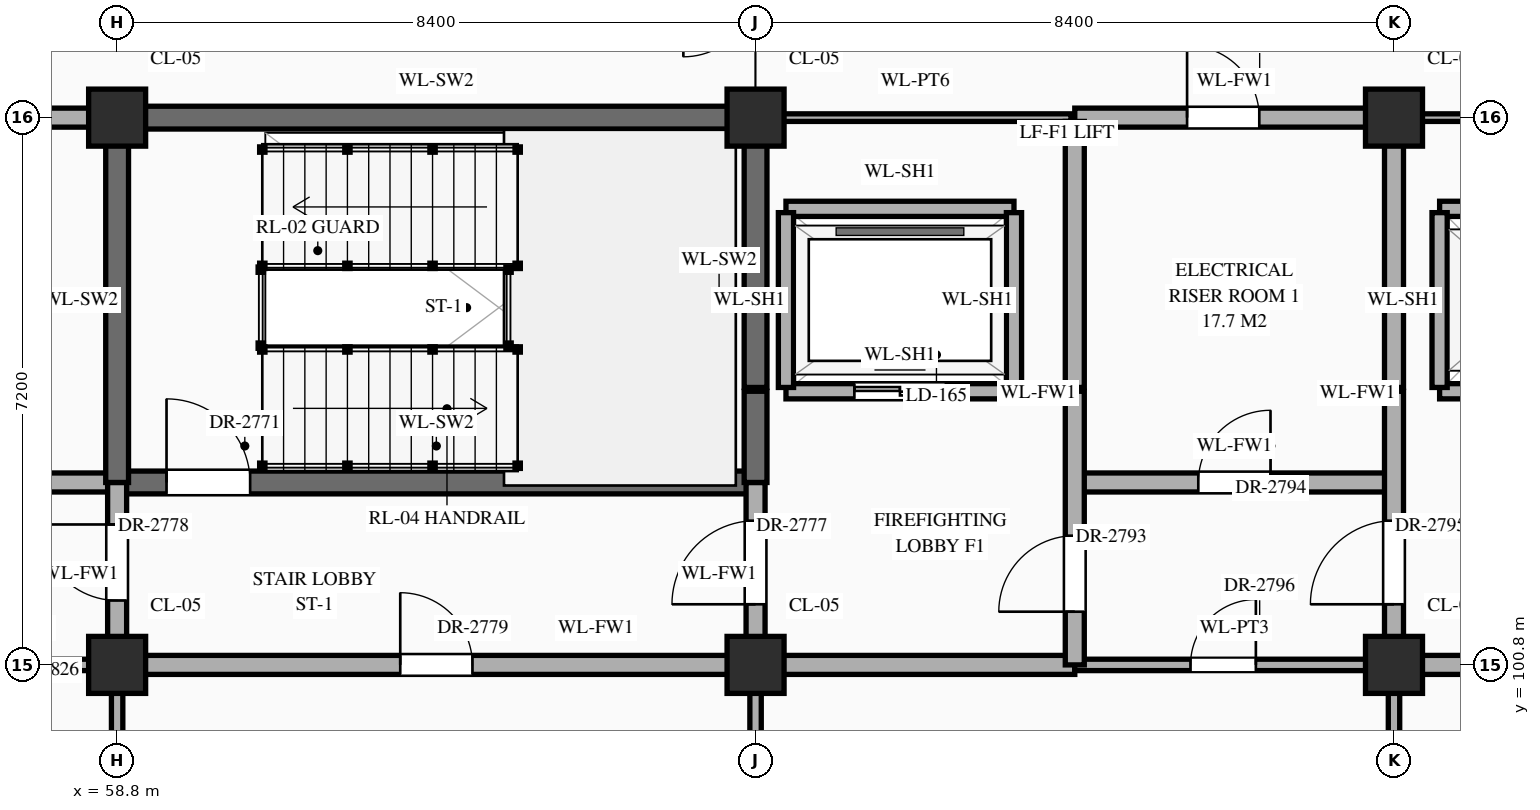
"""IFC4 building model, lengths in metres.
Left out: names, types, materials, properties, quantities, classifications, styles, units other than length and angle.
Written with IfcOpenShell. Run it as: python <this file> out.ifc"""

import sys

from ifc_helpers import new_model, si_unit, direction, frame, frame_2d, origin, origin_2d, place, context, subcontext, project, spatial, rectangle, extrude, element, fill, save


model = new_model("IFC4")
c1 = context("Model", 3, precision=1e-05, world=origin(), true_north=direction((0.0, 1.0)))
c2 = subcontext(c1, "Body", "Model", "MODEL_VIEW")
j1 = project(units=[si_unit("LENGTHUNIT", "METRE"), si_unit("PLANEANGLEUNIT", "RADIAN")], contexts=[c1])
p1 = place(None, origin())
s1 = spatial("IfcSite", under=j1, at=p1, CompositionType="ELEMENT")
p2 = place(p1, origin())
s2 = spatial("IfcBuilding", under=s1, at=p2, CompositionType="ELEMENT")
p3 = place(p2, frame((0.0, 0.0, 43.5)))
s3 = spatial("IfcBuildingStorey", under=s2, at=p3, CompositionType="ELEMENT", Elevation=43.5)
for number, where, z_axis, x_axis in (
    (1, (58.8, 100.8, 0.0), (0.0, 0.0, 1.0), (1.0, 0.0, 0.0)),
    (2, (58.8, 108.0, 0.0), (0.0, 0.0, 1.0), (1.0, 0.0, 0.0)),
    (3, (67.2, 100.8, 0.0), (0.0, 0.0, 1.0), (1.0, 0.0, 0.0)),
    (4, (67.2, 108.0, 0.0), (0.0, 0.0, 1.0), (1.0, 0.0, 0.0)),
    (5, (75.6, 100.8, 0.0), (0.0, 0.0, 1.0), (1.0, 0.0, 0.0)),
    (6, (75.6, 108.0, 0.0), (0.0, 0.0, 1.0), (1.0, 0.0, 0.0)),
):
    element("IfcColumn", number, at=place(p3, frame(where, z_axis=z_axis, x_axis=x_axis)), inside=s3, PredefinedType="COLUMN", context=c2, shape_type="SweptSolid", body=[
        extrude(rectangle(XDim=0.75, YDim=0.75, at=origin_2d()), origin(), (0.0, 0.0, 1.0), 4.2),
    ])
p4 = place(p3, frame((56.2, 100.8, 0.0), z_axis=(0.0, 0.0, 1.0), x_axis=(1.0, 0.0, 0.0)))
e7 = element("IfcWall", 7, at=p4, inside=s3, PredefinedType="STANDARD", context=c2, shape_type="SweptSolid", body=[
    extrude(rectangle(XDim=2.6, YDim=0.15, at=frame_2d((1.3, 0.0))), origin(), (0.0, 0.0, 1.0), 3.1),
])
p5 = place(p4, frame((0.643, 0.0, 0.0)))
e8 = element("IfcOpeningElement", 8, at=p5, cuts=e7, PredefinedType="OPENING", context=c2, shape_type="SweptSolid", body=[
    extrude(rectangle(XDim=1.02, YDim=2.4, at=frame_2d((0.51, 1.2))), frame((0.0, 0.087, 0.0), z_axis=(0.0, -1.0, 0.0), x_axis=(1.0, 0.0, 0.0)), (0.0, 0.0, 1.0), 0.174),
])
p6 = place(p3, frame((58.8, 100.8, 0.0), z_axis=(0.0, 0.0, 1.0), x_axis=(1.0, 0.0, 0.0)))
e9 = element("IfcWall", 9, at=p6, inside=s3, PredefinedType="STANDARD", context=c2, shape_type="SweptSolid", body=[
    extrude(rectangle(XDim=12.6, YDim=0.25, at=frame_2d((6.3, 0.0))), origin(), (0.0, 0.0, 1.0), 3.1),
])
p7 = place(p6, frame((3.725, 0.0, 0.0)))
e10 = element("IfcOpeningElement", 10, at=p7, cuts=e9, PredefinedType="OPENING", context=c2, shape_type="SweptSolid", body=[
    extrude(rectangle(XDim=0.95, YDim=2.15, at=frame_2d((0.475, 1.075))), frame((0.0, 0.137, 0.0), z_axis=(0.0, -1.0, 0.0), x_axis=(1.0, 0.0, 0.0)), (0.0, 0.0, 1.0), 0.274),
])
p8 = place(p3, frame((71.4, 100.8, 0.0), z_axis=(0.0, 0.0, 1.0), x_axis=(1.0, 0.0, 0.0)))
e11 = element("IfcWall", 11, at=p8, inside=s3, PredefinedType="STANDARD", context=c2, shape_type="SweptSolid", body=[
    extrude(rectangle(XDim=4.2, YDim=0.15, at=frame_2d((2.1, 0.0))), origin(), (0.0, 0.0, 1.0), 3.1),
])
p9 = place(p8, frame((1.522, 0.0, 0.0)))
e12 = element("IfcOpeningElement", 12, at=p9, cuts=e11, PredefinedType="OPENING", context=c2, shape_type="SweptSolid", body=[
    extrude(rectangle(XDim=0.86, YDim=2.1, at=frame_2d((0.43, 1.05))), frame((0.0, 0.087, 0.0), z_axis=(0.0, -1.0, 0.0), x_axis=(1.0, 0.0, 0.0)), (0.0, 0.0, 1.0), 0.174),
])
p10 = place(p3, frame((75.6, 100.8, 0.0), z_axis=(0.0, 0.0, 1.0), x_axis=(1.0, 0.0, 0.0)))
e13 = element("IfcWall", 13, at=p10, inside=s3, PredefinedType="STANDARD", context=c2, shape_type="SweptSolid", body=[
    extrude(rectangle(XDim=16.8, YDim=0.25, at=frame_2d((8.4, 0.0))), origin(), (0.0, 0.0, 1.0), 3.1),
])
p11 = place(p10, frame((3.725, 0.0, 0.0)))
e14 = element("IfcOpeningElement", 14, at=p11, cuts=e13, PredefinedType="OPENING", context=c2, shape_type="SweptSolid", body=[
    extrude(rectangle(XDim=0.95, YDim=2.15, at=frame_2d((0.475, 1.075))), frame((0.0, 0.137, 0.0), z_axis=(0.0, -1.0, 0.0), x_axis=(1.0, 0.0, 0.0)), (0.0, 0.0, 1.0), 0.274),
])
p12 = place(p10, frame((9.748, 0.0, 0.0)))
e15 = element("IfcOpeningElement", 15, at=p12, cuts=e13, PredefinedType="OPENING", context=c2, shape_type="SweptSolid", body=[
    extrude(rectangle(XDim=1.0, YDim=2.2, at=frame_2d((0.5, 1.1))), frame((0.0, 0.137, 0.0), z_axis=(0.0, -1.0, 0.0), x_axis=(1.0, 0.0, 0.0)), (0.0, 0.0, 1.0), 0.274),
])
p13 = place(p10, frame((12.525, 0.0, 0.0)))
e16 = element("IfcOpeningElement", 16, at=p13, cuts=e13, PredefinedType="OPENING", context=c2, shape_type="SweptSolid", body=[
    extrude(rectangle(XDim=0.95, YDim=2.15, at=frame_2d((0.475, 1.075))), frame((0.0, 0.137, 0.0), z_axis=(0.0, -1.0, 0.0), x_axis=(1.0, 0.0, 0.0)), (0.0, 0.0, 1.0), 0.274),
])
p14 = place(p10, frame((14.802, 0.0, 0.0)))
e17 = element("IfcOpeningElement", 17, at=p14, cuts=e13, PredefinedType="OPENING", context=c2, shape_type="SweptSolid", body=[
    extrude(rectangle(XDim=1.1, YDim=2.2, at=frame_2d((0.55, 1.1))), frame((0.0, 0.137, 0.0), z_axis=(0.0, -1.0, 0.0), x_axis=(1.0, 0.0, 0.0)), (0.0, 0.0, 1.0), 0.274),
])
p15 = place(p3, frame((54.6, 103.2, 0.0), z_axis=(0.0, 0.0, 1.0), x_axis=(1.0, 0.0, 0.0)))
e18 = element("IfcWall", 18, at=p15, inside=s3, PredefinedType="STANDARD", context=c2, shape_type="SweptSolid", body=[
    extrude(rectangle(XDim=4.2, YDim=0.25, at=frame_2d((2.1, 0.0))), origin(), (0.0, 0.0, 1.0), 3.95),
])
p16 = place(p15, frame((1.625, 0.0, 0.0)))
e19 = element("IfcOpeningElement", 19, at=p16, cuts=e18, PredefinedType="OPENING", context=c2, shape_type="SweptSolid", body=[
    extrude(rectangle(XDim=0.95, YDim=2.15, at=frame_2d((0.475, 1.075))), frame((0.0, 0.137, 0.0), z_axis=(0.0, -1.0, 0.0), x_axis=(1.0, 0.0, 0.0)), (0.0, 0.0, 1.0), 0.274),
])
p17 = place(p3, frame((58.8, 103.2, 0.0), z_axis=(0.0, 0.0, 1.0), x_axis=(1.0, 0.0, 0.0)))
e20 = element("IfcWall", 20, at=p17, inside=s3, PredefinedType="SHEAR", context=c2, shape_type="SweptSolid", body=[
    extrude(rectangle(XDim=8.4, YDim=0.3, at=frame_2d((4.2, 0.0))), origin(), (0.0, 0.0, 1.0), 3.95),
])
p18 = place(p17, frame((0.65, 0.0, 0.0)))
e21 = element("IfcOpeningElement", 21, at=p18, cuts=e20, PredefinedType="OPENING", context=c2, shape_type="SweptSolid", body=[
    extrude(rectangle(XDim=1.1, YDim=2.2, at=frame_2d((0.55, 1.1))), frame((0.0, 0.162, 0.0), z_axis=(0.0, -1.0, 0.0), x_axis=(1.0, 0.0, 0.0)), (0.0, 0.0, 1.0), 0.324),
])
p19 = place(p3, frame((71.4, 103.2, 0.0), z_axis=(0.0, 0.0, 1.0), x_axis=(1.0, 0.0, 0.0)))
e22 = element("IfcWall", 22, at=p19, inside=s3, PredefinedType="STANDARD", context=c2, shape_type="SweptSolid", body=[
    extrude(rectangle(XDim=4.2, YDim=0.25, at=frame_2d((2.1, 0.0))), origin(), (0.0, 0.0, 1.0), 3.95),
])
p20 = place(p19, frame((1.625, 0.0, 0.0)))
e23 = element("IfcOpeningElement", 23, at=p20, cuts=e22, PredefinedType="OPENING", context=c2, shape_type="SweptSolid", body=[
    extrude(rectangle(XDim=0.95, YDim=2.15, at=frame_2d((0.475, 1.075))), frame((0.0, 0.137, 0.0), z_axis=(0.0, -1.0, 0.0), x_axis=(1.0, 0.0, 0.0)), (0.0, 0.0, 1.0), 0.274),
])
p21 = place(p3, frame((67.6, 104.4, 0.0), z_axis=(0.0, 0.0, 1.0), x_axis=(1.0, 0.0, 0.0)))
e24 = element("IfcWall", 24, at=p21, inside=s3, PredefinedType="STANDARD", context=c2, shape_type="SweptSolid", body=[
    extrude(rectangle(XDim=3.0, YDim=0.2, at=frame_2d((1.5, 0.0))), origin(), (0.0, 0.0, 1.0), 3.95),
])
p22 = place(p21, frame((0.9, 0.0, 0.0)))
e25 = element("IfcOpeningElement", 25, at=p22, cuts=e24, PredefinedType="OPENING", context=c2, shape_type="SweptSolid", body=[
    extrude(rectangle(XDim=1.2, YDim=2.15, at=frame_2d((0.6, 1.075))), frame((0.0, 0.112, 0.0), z_axis=(0.0, -1.0, 0.0), x_axis=(1.0, 0.0, 0.0)), (0.0, 0.0, 1.0), 0.224),
])
p23 = place(p3, frame((76.2, 104.4, 0.0), z_axis=(0.0, 0.0, 1.0), x_axis=(1.0, 0.0, 0.0)))
e26 = element("IfcWall", 26, at=p23, inside=s3, PredefinedType="STANDARD", context=c2, shape_type="SweptSolid", body=[
    extrude(rectangle(XDim=2.4, YDim=0.2, at=frame_2d((1.2, 0.0))), origin(), (0.0, 0.0, 1.0), 3.95),
])
p24 = place(p23, frame((0.7, 0.0, 0.0)))
e27 = element("IfcOpeningElement", 27, at=p24, cuts=e26, PredefinedType="OPENING", context=c2, shape_type="SweptSolid", body=[
    extrude(rectangle(XDim=1.0, YDim=2.15, at=frame_2d((0.5, 1.075))), frame((0.0, 0.112, 0.0), z_axis=(0.0, -1.0, 0.0), x_axis=(1.0, 0.0, 0.0)), (0.0, 0.0, 1.0), 0.224),
])
p25 = place(p3, frame((67.6, 106.8, 0.0), z_axis=(0.0, 0.0, 1.0), x_axis=(1.0, 0.0, 0.0)))
e28 = element("IfcWall", 28, at=p25, inside=s3, PredefinedType="STANDARD", context=c2, shape_type="SweptSolid", body=[
    extrude(rectangle(XDim=3.0, YDim=0.2, at=frame_2d((1.5, 0.0))), origin(), (0.0, 0.0, 1.0), 3.95),
])
p26 = place(p3, frame((76.2, 106.8, 0.0), z_axis=(0.0, 0.0, 1.0), x_axis=(1.0, 0.0, 0.0)))
e29 = element("IfcWall", 29, at=p26, inside=s3, PredefinedType="STANDARD", context=c2, shape_type="SweptSolid", body=[
    extrude(rectangle(XDim=2.4, YDim=0.2, at=frame_2d((1.2, 0.0))), origin(), (0.0, 0.0, 1.0), 3.95),
])
p27 = place(p3, frame((54.6, 108.0, 0.0), z_axis=(0.0, 0.0, 1.0), x_axis=(1.0, 0.0, 0.0)))
e30 = element("IfcWall", 30, at=p27, inside=s3, PredefinedType="STANDARD", context=c2, shape_type="SweptSolid", body=[
    extrude(rectangle(XDim=4.2, YDim=0.25, at=frame_2d((2.1, 0.0))), origin(), (0.0, 0.0, 1.0), 3.1),
])
p28 = place(p27, frame((1.478, 0.0, 0.0)))
e31 = element("IfcOpeningElement", 31, at=p28, cuts=e30, PredefinedType="OPENING", context=c2, shape_type="SweptSolid", body=[
    extrude(rectangle(XDim=0.95, YDim=2.15, at=frame_2d((0.475, 1.075))), frame((0.0, 0.137, 0.0), z_axis=(0.0, -1.0, 0.0), x_axis=(1.0, 0.0, 0.0)), (0.0, 0.0, 1.0), 0.274),
])
p29 = place(p3, frame((58.8, 108.0, 0.0), z_axis=(0.0, 0.0, 1.0), x_axis=(1.0, 0.0, 0.0)))
e32 = element("IfcWall", 32, at=p29, inside=s3, PredefinedType="SHEAR", context=c2, shape_type="SweptSolid", body=[
    extrude(rectangle(XDim=8.4, YDim=0.3, at=frame_2d((4.2, 0.0))), origin(), (0.0, 0.0, 1.0), 3.95),
])
p30 = place(p3, frame((67.25, 108.0, 0.0), z_axis=(0.0, 0.0, 1.0), x_axis=(1.0, 0.0, 0.0)))
e33 = element("IfcWall", 33, at=p30, inside=s3, PredefinedType="STANDARD", context=c2, shape_type="SweptSolid", body=[
    extrude(rectangle(XDim=4.1, YDim=0.1, at=frame_2d((2.05, 0.0))), origin(), (0.0, 0.0, 1.0), 3.1),
])
p31 = place(p3, frame((71.4, 108.0, 0.0), z_axis=(0.0, 0.0, 1.0), x_axis=(1.0, 0.0, 0.0)))
e34 = element("IfcWall", 34, at=p31, inside=s3, PredefinedType="STANDARD", context=c2, shape_type="SweptSolid", body=[
    extrude(rectangle(XDim=4.2, YDim=0.25, at=frame_2d((2.1, 0.0))), origin(), (0.0, 0.0, 1.0), 3.1),
])
p32 = place(p31, frame((1.478, 0.0, 0.0)))
e35 = element("IfcOpeningElement", 35, at=p32, cuts=e34, PredefinedType="OPENING", context=c2, shape_type="SweptSolid", body=[
    extrude(rectangle(XDim=0.95, YDim=2.15, at=frame_2d((0.475, 1.075))), frame((0.0, 0.137, 0.0), z_axis=(0.0, -1.0, 0.0), x_axis=(1.0, 0.0, 0.0)), (0.0, 0.0, 1.0), 0.274),
])
p33 = place(p3, frame((75.65, 108.0, 0.0), z_axis=(0.0, 0.0, 1.0), x_axis=(1.0, 0.0, 0.0)))
e36 = element("IfcWall", 36, at=p33, inside=s3, PredefinedType="STANDARD", context=c2, shape_type="SweptSolid", body=[
    extrude(rectangle(XDim=6.15, YDim=0.1, at=frame_2d((3.075, 0.0))), origin(), (0.0, 0.0, 1.0), 3.1),
])
p34 = place(p3, frame((58.8, 96.0, 0.0), z_axis=(0.0, 0.0, 1.0), x_axis=(0.0, 1.0, 0.0)))
e37 = element("IfcWall", 37, at=p34, inside=s3, PredefinedType="STANDARD", context=c2, shape_type="SweptSolid", body=[
    extrude(rectangle(XDim=4.8, YDim=0.15, at=frame_2d((2.4, 0.0))), origin(), (0.0, 0.0, 1.0), 3.2),
])
p35 = place(p3, frame((58.8, 100.8, 0.0), z_axis=(0.0, 0.0, 1.0), x_axis=(0.0, 1.0, 0.0)))
e38 = element("IfcWall", 38, at=p35, inside=s3, PredefinedType="STANDARD", context=c2, shape_type="SweptSolid", body=[
    extrude(rectangle(XDim=2.4, YDim=0.25, at=frame_2d((1.2, 0.0))), origin(), (0.0, 0.0, 1.0), 3.2),
])
p36 = place(p35, frame((0.847, 0.0, 0.0)))
e39 = element("IfcOpeningElement", 39, at=p36, cuts=e38, PredefinedType="OPENING", context=c2, shape_type="SweptSolid", body=[
    extrude(rectangle(XDim=1.0, YDim=2.2, at=frame_2d((0.5, 1.1))), frame((0.0, 0.137, 0.0), z_axis=(0.0, -1.0, 0.0), x_axis=(1.0, 0.0, 0.0)), (0.0, 0.0, 1.0), 0.274),
])
p37 = place(p3, frame((58.8, 103.2, 0.0), z_axis=(0.0, 0.0, 1.0), x_axis=(0.0, 1.0, 0.0)))
e40 = element("IfcWall", 40, at=p37, inside=s3, PredefinedType="SHEAR", context=c2, shape_type="SweptSolid", body=[
    extrude(rectangle(XDim=4.8, YDim=0.3, at=frame_2d((2.4, 0.0))), origin(), (0.0, 0.0, 1.0), 3.95),
])
p38 = place(p3, frame((67.2, 96.0, 0.0), z_axis=(0.0, 0.0, 1.0), x_axis=(0.0, 1.0, 0.0)))
e41 = element("IfcWall", 41, at=p38, inside=s3, PredefinedType="STANDARD", context=c2, shape_type="SweptSolid", body=[
    extrude(rectangle(XDim=4.8, YDim=0.15, at=frame_2d((2.4, 0.0))), origin(), (0.0, 0.0, 1.0), 3.2),
])
p39 = place(p3, frame((67.2, 100.8, 0.0), z_axis=(0.0, 0.0, 1.0), x_axis=(0.0, 1.0, 0.0)))
e42 = element("IfcWall", 42, at=p39, inside=s3, PredefinedType="STANDARD", context=c2, shape_type="SweptSolid", body=[
    extrude(rectangle(XDim=2.4, YDim=0.25, at=frame_2d((1.2, 0.0))), origin(), (0.0, 0.0, 1.0), 3.2),
])
p40 = place(p39, frame((0.798, 0.0, 0.0)))
e43 = element("IfcOpeningElement", 43, at=p40, cuts=e42, PredefinedType="OPENING", context=c2, shape_type="SweptSolid", body=[
    extrude(rectangle(XDim=1.1, YDim=2.2, at=frame_2d((0.55, 1.1))), frame((0.0, 0.137, 0.0), z_axis=(0.0, -1.0, 0.0), x_axis=(1.0, 0.0, 0.0)), (0.0, 0.0, 1.0), 0.274),
])
p41 = place(p3, frame((67.2, 103.2, 0.0), z_axis=(0.0, 0.0, 1.0), x_axis=(0.0, 1.0, 0.0)))
e44 = element("IfcWall", 44, at=p41, inside=s3, PredefinedType="SHEAR", context=c2, shape_type="SweptSolid", body=[
    extrude(rectangle(XDim=1.2, YDim=0.3, at=frame_2d((0.6, 0.0))), origin(), (0.0, 0.0, 1.0), 3.95),
])
p42 = place(p3, frame((67.2, 104.45, 0.0), z_axis=(0.0, 0.0, 1.0), x_axis=(0.0, 1.0, 0.0)))
e45 = element("IfcWall", 45, at=p42, inside=s3, PredefinedType="SHEAR", context=c2, shape_type="SweptSolid", body=[
    extrude(rectangle(XDim=3.5, YDim=0.3, at=frame_2d((1.75, 0.0))), origin(), (0.0, 0.0, 1.0), 3.95),
])
for number, where, z_axis, x_axis in (
    (46, (67.6, 104.45, 0.0), (0.0, 0.0, 1.0), (0.0, 1.0, 0.0)),
    (47, (70.6, 104.45, 0.0), (0.0, 0.0, 1.0), (0.0, 1.0, 0.0)),
):
    element("IfcWall", number, at=place(p3, frame(where, z_axis=z_axis, x_axis=x_axis)), inside=s3, PredefinedType="STANDARD", context=c2, shape_type="SweptSolid", body=[
        extrude(rectangle(XDim=2.3, YDim=0.2, at=frame_2d((1.15, 0.0))), origin(), (0.0, 0.0, 1.0), 3.95),
    ])
p43 = place(p3, frame((71.4, 100.8, 0.0), z_axis=(0.0, 0.0, 1.0), x_axis=(0.0, 1.0, 0.0)))
e48 = element("IfcWall", 48, at=p43, inside=s3, PredefinedType="STANDARD", context=c2, shape_type="SweptSolid", body=[
    extrude(rectangle(XDim=3.6, YDim=0.25, at=frame_2d((1.8, 0.0))), origin(), (0.0, 0.0, 1.0), 3.6),
])
p44 = place(p43, frame((0.7, 0.0, 0.0)))
e49 = element("IfcOpeningElement", 49, at=p44, cuts=e48, PredefinedType="OPENING", context=c2, shape_type="SweptSolid", body=[
    extrude(rectangle(XDim=1.0, YDim=2.2, at=frame_2d((0.5, 1.1))), frame((0.0, 0.137, 0.0), z_axis=(0.0, -1.0, 0.0), x_axis=(1.0, 0.0, 0.0)), (0.0, 0.0, 1.0), 0.274),
])
p45 = place(p3, frame((71.4, 104.45, 0.0), z_axis=(0.0, 0.0, 1.0), x_axis=(0.0, 1.0, 0.0)))
e50 = element("IfcWall", 50, at=p45, inside=s3, PredefinedType="STANDARD", context=c2, shape_type="SweptSolid", body=[
    extrude(rectangle(XDim=3.5, YDim=0.25, at=frame_2d((1.75, 0.0))), origin(), (0.0, 0.0, 1.0), 3.6),
])
p46 = place(p3, frame((75.6, 96.0, 0.0), z_axis=(0.0, 0.0, 1.0), x_axis=(0.0, 1.0, 0.0)))
e51 = element("IfcWall", 51, at=p46, inside=s3, PredefinedType="STANDARD", context=c2, shape_type="SweptSolid", body=[
    extrude(rectangle(XDim=4.8, YDim=0.15, at=frame_2d((2.4, 0.0))), origin(), (0.0, 0.0, 1.0), 3.2),
])
p47 = place(p3, frame((75.6, 100.8, 0.0), z_axis=(0.0, 0.0, 1.0), x_axis=(0.0, 1.0, 0.0)))
e52 = element("IfcWall", 52, at=p47, inside=s3, PredefinedType="STANDARD", context=c2, shape_type="SweptSolid", body=[
    extrude(rectangle(XDim=3.6, YDim=0.25, at=frame_2d((1.8, 0.0))), origin(), (0.0, 0.0, 1.0), 3.2),
])
p48 = place(p47, frame((0.798, 0.0, 0.0)))
e53 = element("IfcOpeningElement", 53, at=p48, cuts=e52, PredefinedType="OPENING", context=c2, shape_type="SweptSolid", body=[
    extrude(rectangle(XDim=1.1, YDim=2.2, at=frame_2d((0.55, 1.1))), frame((0.0, 0.137, 0.0), z_axis=(0.0, -1.0, 0.0), x_axis=(1.0, 0.0, 0.0)), (0.0, 0.0, 1.0), 0.274),
])
p49 = place(p3, frame((75.6, 104.45, 0.0), z_axis=(0.0, 0.0, 1.0), x_axis=(0.0, 1.0, 0.0)))
e54 = element("IfcWall", 54, at=p49, inside=s3, PredefinedType="STANDARD", context=c2, shape_type="SweptSolid", body=[
    extrude(rectangle(XDim=3.5, YDim=0.25, at=frame_2d((1.75, 0.0))), origin(), (0.0, 0.0, 1.0), 3.2),
])
p50 = place(p3, frame((76.2, 104.45, 0.0), z_axis=(0.0, 0.0, 1.0), x_axis=(0.0, 1.0, 0.0)))
e55 = element("IfcWall", 55, at=p50, inside=s3, PredefinedType="STANDARD", context=c2, shape_type="SweptSolid", body=[
    extrude(rectangle(XDim=2.3, YDim=0.2, at=frame_2d((1.15, 0.0))), origin(), (0.0, 0.0, 1.0), 3.95),
])
p51 = place(p22, origin())
e56 = element("IfcDoor", 56, at=p51, inside=s3, OperationType="DOUBLE_DOOR_SLIDING", PredefinedType="DOOR", context=c2, shape_type="SweptSolid", body=[
    extrude(rectangle(XDim=1.2, YDim=2.15, at=frame_2d((0.6, 1.075))), frame((0.0, 0.025, 0.0), z_axis=(0.0, -1.0, 0.0), x_axis=(1.0, 0.0, 0.0)), (0.0, 0.0, 1.0), 0.05),
])
fill(e25, e56)
p52 = place(p18, origin())
e57 = element("IfcDoor", 57, at=p52, inside=s3, OperationType="SINGLE_SWING_LEFT", PredefinedType="DOOR", context=c2, shape_type="SweptSolid", body=[
    extrude(rectangle(XDim=1.1, YDim=2.2, at=frame_2d((0.55, 1.1))), frame((0.0, 0.025, 0.0), z_axis=(0.0, -1.0, 0.0), x_axis=(1.0, 0.0, 0.0)), (0.0, 0.0, 1.0), 0.05),
])
fill(e21, e57)
p53 = place(p40, origin())
e58 = element("IfcDoor", 58, at=p53, inside=s3, OperationType="SINGLE_SWING_LEFT", PredefinedType="DOOR", context=c2, shape_type="SweptSolid", body=[
    extrude(rectangle(XDim=1.1, YDim=2.2, at=frame_2d((0.55, 1.1))), frame((0.0, 0.025, 0.0), z_axis=(0.0, -1.0, 0.0), x_axis=(1.0, 0.0, 0.0)), (0.0, 0.0, 1.0), 0.05),
])
fill(e43, e58)
p54 = place(p36, origin())
e59 = element("IfcDoor", 59, at=p54, inside=s3, OperationType="SINGLE_SWING_RIGHT", PredefinedType="DOOR", context=c2, shape_type="SweptSolid", body=[
    extrude(rectangle(XDim=1.0, YDim=2.2, at=frame_2d((0.5, 1.1))), frame((0.0, 0.025, 0.0), z_axis=(0.0, -1.0, 0.0), x_axis=(1.0, 0.0, 0.0)), (0.0, 0.0, 1.0), 0.05),
])
fill(e39, e59)
p55 = place(p7, origin())
e60 = element("IfcDoor", 60, at=p55, inside=s3, OperationType="SINGLE_SWING_LEFT", PredefinedType="DOOR", context=c2, shape_type="SweptSolid", body=[
    extrude(rectangle(XDim=0.95, YDim=2.15, at=frame_2d((0.475, 1.075))), frame((0.0, 0.025, 0.0), z_axis=(0.0, -1.0, 0.0), x_axis=(1.0, 0.0, 0.0)), (0.0, 0.0, 1.0), 0.05),
])
fill(e10, e60)
p56 = place(p44, origin())
e61 = element("IfcDoor", 61, at=p56, inside=s3, OperationType="SINGLE_SWING_LEFT", PredefinedType="DOOR", context=c2, shape_type="SweptSolid", body=[
    extrude(rectangle(XDim=1.0, YDim=2.2, at=frame_2d((0.5, 1.1))), frame((0.0, 0.025, 0.0), z_axis=(0.0, -1.0, 0.0), x_axis=(1.0, 0.0, 0.0)), (0.0, 0.0, 1.0), 0.05),
])
fill(e49, e61)
p57 = place(p20, origin())
e62 = element("IfcDoor", 62, at=p57, inside=s3, OperationType="SINGLE_SWING_RIGHT", PredefinedType="DOOR", context=c2, shape_type="SweptSolid", body=[
    extrude(rectangle(XDim=0.95, YDim=2.15, at=frame_2d((0.475, 1.075))), frame((0.0, 0.025, 0.0), z_axis=(0.0, -1.0, 0.0), x_axis=(1.0, 0.0, 0.0)), (0.0, 0.0, 1.0), 0.05),
])
fill(e23, e62)
p58 = place(p48, origin())
e63 = element("IfcDoor", 63, at=p58, inside=s3, OperationType="SINGLE_SWING_LEFT", PredefinedType="DOOR", context=c2, shape_type="SweptSolid", body=[
    extrude(rectangle(XDim=1.1, YDim=2.2, at=frame_2d((0.55, 1.1))), frame((0.0, 0.025, 0.0), z_axis=(0.0, -1.0, 0.0), x_axis=(1.0, 0.0, 0.0)), (0.0, 0.0, 1.0), 0.05),
])
fill(e53, e63)
p59 = place(p9, origin())
e64 = element("IfcDoor", 64, at=p59, inside=s3, OperationType="SINGLE_SWING_RIGHT", PredefinedType="DOOR", context=c2, shape_type="SweptSolid", body=[
    extrude(rectangle(XDim=0.86, YDim=2.1, at=frame_2d((0.43, 1.05))), frame((0.0, 0.025, 0.0), z_axis=(0.0, -1.0, 0.0), x_axis=(1.0, 0.0, 0.0)), (0.0, 0.0, 1.0), 0.05),
])
fill(e12, e64)
p60 = place(p32, origin())
e65 = element("IfcDoor", 65, at=p60, inside=s3, OperationType="SINGLE_SWING_LEFT", PredefinedType="DOOR", context=c2, shape_type="SweptSolid", body=[
    extrude(rectangle(XDim=0.95, YDim=2.15, at=frame_2d((0.475, 1.075))), frame((0.0, 0.025, 0.0), z_axis=(0.0, -1.0, 0.0), x_axis=(1.0, 0.0, 0.0)), (0.0, 0.0, 1.0), 0.05),
])
fill(e35, e65)
save(model, sys.argv[1])
